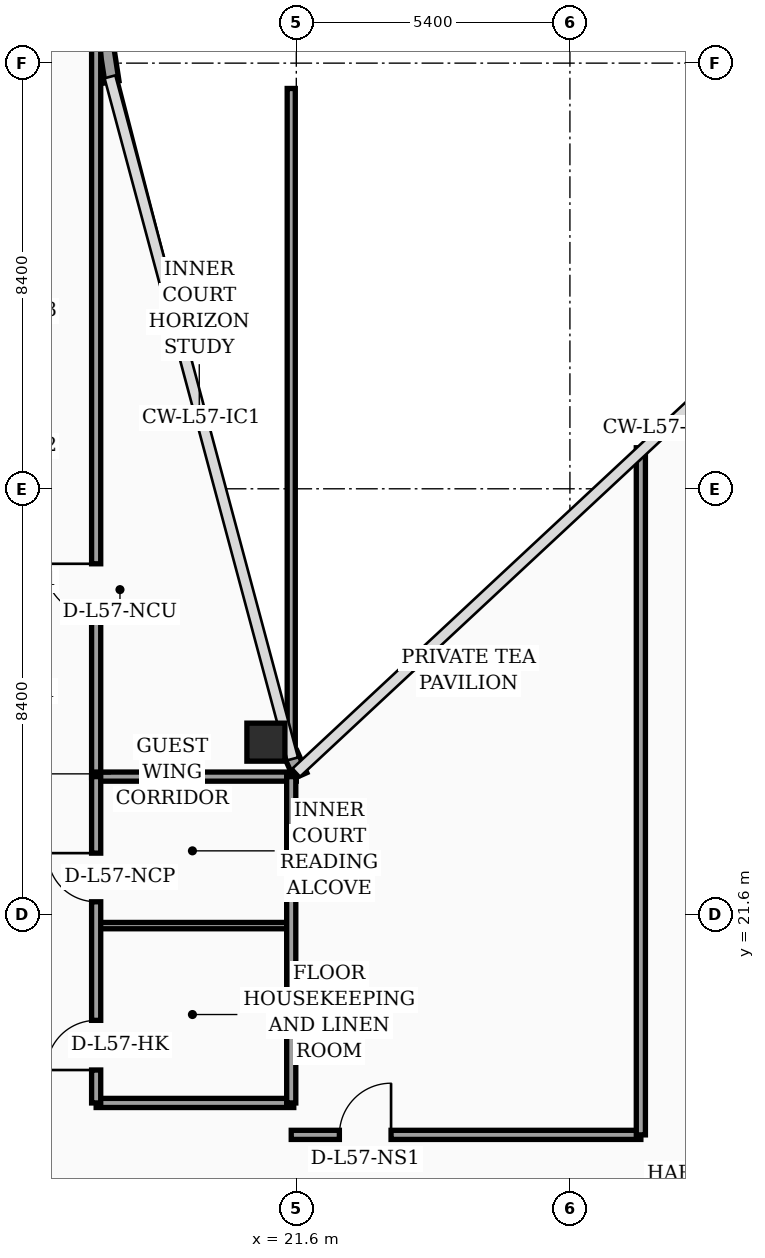
"""IFC4 building model, lengths in metres.
Left out: names, types, materials, properties, quantities, classifications, styles, units other than length and angle.
Written with IfcOpenShell. Run it as: python <this file> out.ifc"""

import sys

from ifc_helpers import new_model, si_unit, direction, frame, frame_2d, origin, origin_2d, place, context, subcontext, project, spatial, rectangle, hollow_rectangle, extrude, element, fill, save


model = new_model("IFC4")
c1 = context("Model", 3, precision=1e-05, world=origin(), true_north=direction((0.0, 1.0)))
c2 = subcontext(c1, "Body", "Model", "MODEL_VIEW")
j1 = project(units=[si_unit("LENGTHUNIT", "METRE"), si_unit("PLANEANGLEUNIT", "RADIAN")], contexts=[c1])
p1 = place(None, origin())
s1 = spatial("IfcSite", under=j1, at=p1, CompositionType="ELEMENT")
p2 = place(p1, origin())
s2 = spatial("IfcBuilding", under=s1, at=p2, CompositionType="ELEMENT")
p3 = place(p2, frame((0.0, 0.0, 230.7)))
s3 = spatial("IfcBuildingStorey", under=s2, at=p3, CompositionType="ELEMENT", Elevation=230.7)
p4 = place(p3, frame((21.0, 25.0, 0.0), z_axis=(0.0, 0.0, 1.0), x_axis=(1.0, 0.0, 0.0)))
e1 = element("IfcColumn", 1, at=p4, inside=s3, PredefinedType="COLUMN", context=c2, shape_type="SweptSolid", body=[
    extrude(hollow_rectangle(XDim=0.75, YDim=0.75, WallThickness=0.032, at=origin_2d()), origin(), (0.0, 0.0, 1.0), 3.52),
])
p5 = place(p3, frame((21.68, 24.34, 0.0), z_axis=(0.0, 0.0, 1.0), x_axis=(-0.40758134973, 0.913168901875, 0.0)))
e2 = element("IfcWall", 2, at=p5, inside=s3, PredefinedType="SOLIDWALL", context=c2, shape_type="SweptSolid", body=[
    extrude(rectangle(XDim=0.471, YDim=0.28, at=frame_2d((0.235, 0.0))), origin(), (0.0, 0.0, 1.0), 3.52),
])
p6 = place(p3, frame((17.962, 38.03, 0.0), z_axis=(0.0, 0.0, 1.0), x_axis=(-0.15141125477, 0.988470855377, 0.0)))
e3 = element("IfcWall", 3, at=p6, inside=s3, PredefinedType="SOLIDWALL", context=c2, shape_type="SweptSolid", body=[
    extrude(rectangle(XDim=0.739, YDim=0.28, at=frame_2d((0.369, 0.0))), origin(), (0.0, 0.0, 1.0), 3.52),
])
p7 = place(p3, frame((17.65, 24.3, 0.0), z_axis=(0.0, 0.0, 1.0), x_axis=(0.0, 1.0, 0.0)))
e4 = element("IfcWall", 4, at=p7, inside=s3, PredefinedType="PARTITIONING", context=c2, shape_type="SweptSolid", body=[
    extrude(rectangle(XDim=18.15, YDim=0.18, at=frame_2d((9.075, 0.0))), origin(), (0.0, 0.0, 1.0), 2.92),
])
p8 = place(p7, frame((3.2, 0.0, 0.0)))
e5 = element("IfcOpeningElement", 5, at=p8, cuts=e4, PredefinedType="OPENING", context=c2, shape_type="SweptSolid", body=[
    extrude(rectangle(XDim=1.02, YDim=2.2, at=frame_2d((0.51, 1.1))), frame((0.0, 0.1, 0.0), z_axis=(0.0, -1.0, 0.0), x_axis=(1.0, 0.0, 0.0)), (0.0, 0.0, 1.0), 0.2),
])
p9 = place(p3, frame((17.65, 17.88, 0.0), z_axis=(0.0, 0.0, 1.0), x_axis=(1.0, 0.0, 0.0)))
e6 = element("IfcWall", 6, at=p9, inside=s3, PredefinedType="PARTITIONING", context=c2, shape_type="SweptSolid", body=[
    extrude(rectangle(XDim=3.9, YDim=0.18, at=frame_2d((1.95, 0.0))), origin(), (0.0, 0.0, 1.0), 3.52),
])
p10 = place(p3, frame((17.65, 21.38, 0.0), z_axis=(0.0, 0.0, 1.0), x_axis=(1.0, 0.0, 0.0)))
e7 = element("IfcWall", 7, at=p10, inside=s3, PredefinedType="PARTITIONING", context=c2, shape_type="SweptSolid", body=[
    extrude(rectangle(XDim=3.9, YDim=0.125, at=frame_2d((1.95, 0.0))), origin(), (0.0, 0.0, 1.0), 3.52),
])
p11 = place(p3, frame((17.65, 24.32, 0.0), z_axis=(0.0, 0.0, 1.0), x_axis=(1.0, 0.0, 0.0)))
e8 = element("IfcWall", 8, at=p11, inside=s3, PredefinedType="PARTITIONING", context=c2, shape_type="SweptSolid", body=[
    extrude(rectangle(XDim=3.95, YDim=0.18, at=frame_2d((1.975, 0.0))), origin(), (0.0, 0.0, 1.0), 3.52),
])
p12 = place(p3, frame((21.5, 17.88, 0.0), z_axis=(0.0, 0.0, 1.0), x_axis=(0.0, 1.0, 0.0)))
e9 = element("IfcWall", 9, at=p12, inside=s3, PredefinedType="PARTITIONING", context=c2, shape_type="SweptSolid", body=[
    extrude(rectangle(XDim=6.44, YDim=0.18, at=frame_2d((3.22, 0.0))), origin(), (0.0, 0.0, 1.0), 3.52),
])
p13 = place(p3, frame((17.65, 17.88, 0.0), z_axis=(0.0, 0.0, 1.0), x_axis=(0.0, 1.0, 0.0)))
e10 = element("IfcWall", 10, at=p13, inside=s3, PredefinedType="PARTITIONING", context=c2, shape_type="SweptSolid", body=[
    extrude(rectangle(XDim=6.44, YDim=0.18, at=frame_2d((3.22, 0.0))), origin(), (0.0, 0.0, 1.0), 3.52),
])
p14 = place(p13, frame((0.65, 0.0, 0.0)))
e11 = element("IfcOpeningElement", 11, at=p14, cuts=e10, PredefinedType="OPENING", context=c2, shape_type="SweptSolid", body=[
    extrude(rectangle(XDim=0.98, YDim=2.15, at=frame_2d((0.49, 1.075))), frame((0.0, 0.1, 0.0), z_axis=(0.0, -1.0, 0.0), x_axis=(1.0, 0.0, 0.0)), (0.0, 0.0, 1.0), 0.2),
])
p15 = place(p13, frame((3.97, 0.0, 0.0)))
e12 = element("IfcOpeningElement", 12, at=p15, cuts=e10, PredefinedType="OPENING", context=c2, shape_type="SweptSolid", body=[
    extrude(rectangle(XDim=0.96, YDim=2.2, at=frame_2d((0.48, 1.1))), frame((0.0, 0.1, 0.0), z_axis=(0.0, -1.0, 0.0), x_axis=(1.0, 0.0, 0.0)), (0.0, 0.0, 1.0), 0.2),
])
p16 = place(p3, frame((21.5, 24.85, 0.0), z_axis=(0.0, 0.0, 1.0), x_axis=(0.0, 1.0, 0.0)))
e13 = element("IfcWall", 13, at=p16, inside=s3, PredefinedType="PARTITIONING", context=c2, shape_type="SweptSolid", body=[
    extrude(rectangle(XDim=13.05, YDim=0.16, at=frame_2d((6.525, 0.0))), origin(), (0.0, 0.0, 1.0), 2.92),
])
p17 = place(p3, frame((21.5, 17.25, 0.0), z_axis=(0.0, 0.0, 1.0), x_axis=(1.0, 0.0, 0.0)))
e14 = element("IfcWall", 14, at=p17, inside=s3, PredefinedType="PARTITIONING", context=c2, shape_type="SweptSolid", body=[
    extrude(rectangle(XDim=6.9, YDim=0.18, at=frame_2d((3.45, 0.0))), origin(), (0.0, 0.0, 1.0), 2.92),
])
p18 = place(p17, frame((0.95, 0.0, 0.0)))
e15 = element("IfcOpeningElement", 15, at=p18, cuts=e14, PredefinedType="OPENING", context=c2, shape_type="SweptSolid", body=[
    extrude(rectangle(XDim=1.02, YDim=2.2, at=frame_2d((0.51, 1.1))), frame((0.0, 0.1, 0.0), z_axis=(0.0, -1.0, 0.0), x_axis=(1.0, 0.0, 0.0)), (0.0, 0.0, 1.0), 0.2),
])
p19 = place(p3, frame((28.4, 17.25, 0.0), z_axis=(0.0, 0.0, 1.0), x_axis=(0.0, 1.0, 0.0)))
e16 = element("IfcWall", 16, at=p19, inside=s3, PredefinedType="PARTITIONING", context=c2, shape_type="SweptSolid", body=[
    extrude(rectangle(XDim=13.56, YDim=0.18, at=frame_2d((6.78, 0.0))), origin(), (0.0, 0.0, 1.0), 2.92),
])
p20 = place(p8, origin())
e17 = element("IfcDoor", 17, at=p20, inside=s3, OperationType="SINGLE_SWING_RIGHT", PredefinedType="DOOR", context=c2, shape_type="SweptSolid", body=[
    extrude(rectangle(XDim=1.02, YDim=2.2, at=frame_2d((0.51, 1.1))), frame((0.0, 0.025, 0.0), z_axis=(0.0, -1.0, 0.0), x_axis=(1.0, 0.0, 0.0)), (0.0, 0.0, 1.0), 0.05),
])
fill(e5, e17)
p21 = place(p14, origin())
e18 = element("IfcDoor", 18, at=p21, inside=s3, OperationType="SINGLE_SWING_LEFT", PredefinedType="DOOR", context=c2, shape_type="SweptSolid", body=[
    extrude(rectangle(XDim=0.98, YDim=2.15, at=frame_2d((0.49, 1.075))), frame((0.0, 0.025, 0.0), z_axis=(0.0, -1.0, 0.0), x_axis=(1.0, 0.0, 0.0)), (0.0, 0.0, 1.0), 0.05),
])
fill(e11, e18)
p22 = place(p15, origin())
e19 = element("IfcDoor", 19, at=p22, inside=s3, OperationType="SINGLE_SWING_RIGHT", PredefinedType="DOOR", context=c2, shape_type="SweptSolid", body=[
    extrude(rectangle(XDim=0.96, YDim=2.2, at=frame_2d((0.48, 1.1))), frame((0.0, 0.025, 0.0), z_axis=(0.0, -1.0, 0.0), x_axis=(1.0, 0.0, 0.0)), (0.0, 0.0, 1.0), 0.05),
])
fill(e12, e19)
p23 = place(p18, origin())
e20 = element("IfcDoor", 20, at=p23, inside=s3, OperationType="SINGLE_SWING_RIGHT", PredefinedType="DOOR", context=c2, shape_type="SweptSolid", body=[
    extrude(rectangle(XDim=1.02, YDim=2.2, at=frame_2d((0.51, 1.1))), frame((0.0, 0.025, 0.0), z_axis=(0.0, -1.0, 0.0), x_axis=(1.0, 0.0, 0.0)), (0.0, 0.0, 1.0), 0.05),
])
fill(e15, e20)
save(model, sys.argv[1])
